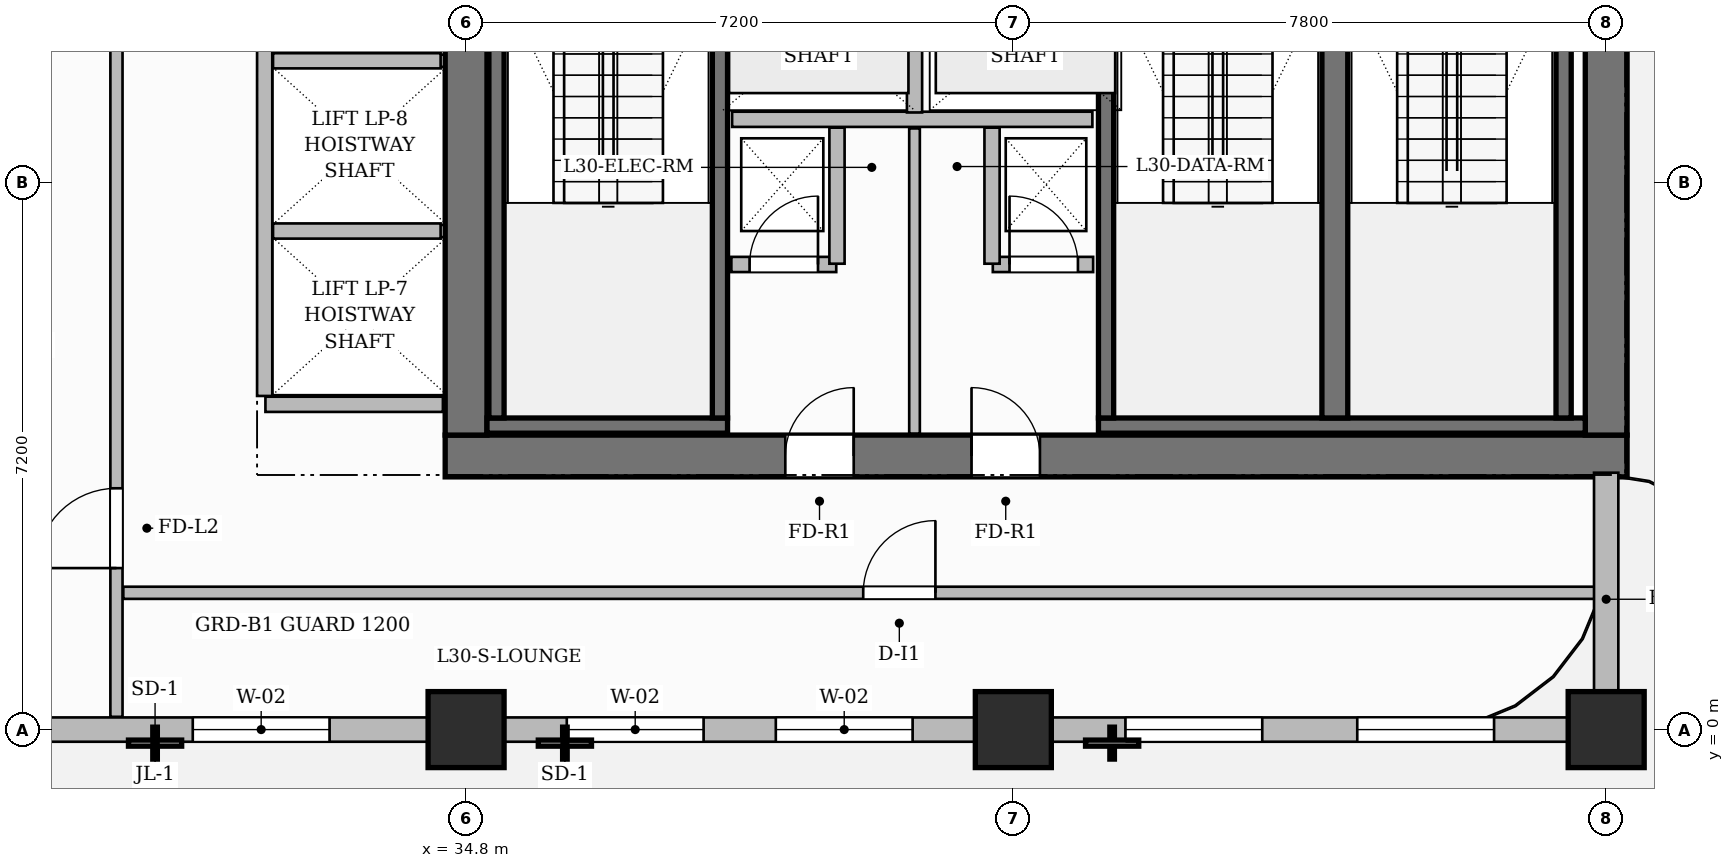
"""IFC4 building model, lengths in metres.
Left out: names, types, materials, properties, quantities, classifications, styles, units other than length and angle.
Written with IfcOpenShell. Run it as: python <this file> out.ifc"""

import sys

from ifc_helpers import new_model, si_unit, direction, frame, frame_2d, origin, origin_2d, place, context, subcontext, project, spatial, rectangle, extrude, source, transform, mapped, element, fill, save


model = new_model("IFC4")
c1 = context("Model", 3, precision=1e-05, world=origin(), true_north=direction((0.0, 1.0)))
c2 = subcontext(c1, "Body", "Model", "MODEL_VIEW")
j1 = project(units=[si_unit("LENGTHUNIT", "METRE"), si_unit("PLANEANGLEUNIT", "RADIAN")], contexts=[c1])
p1 = place(None, origin())
s1 = spatial("IfcSite", under=j1, at=p1, CompositionType="ELEMENT")
p2 = place(p1, origin())
s2 = spatial("IfcBuilding", under=s1, at=p2, CompositionType="ELEMENT")
p3 = place(p2, frame((0.0, 0.0, 122.9)))
s3 = spatial("IfcBuildingStorey", under=s2, at=p3, CompositionType="ELEMENT", Elevation=122.9)
p4 = place(p3, frame((34.525, 3.6, 0.0), z_axis=(0.0, 0.0, 1.0), x_axis=(1.0, 0.0, 0.0)))
e1 = element("IfcWall", 1, at=p4, inside=s3, PredefinedType="SHEAR", context=c2, shape_type="SweptSolid", body=[
    extrude(rectangle(XDim=15.55, YDim=0.55, at=frame_2d((7.775, 0.0))), origin(), (0.0, 0.0, 1.0), 3.7),
])
p5 = place(p4, frame((4.475, 0.0, 0.0)))
e2 = element("IfcOpeningElement", 2, at=p5, cuts=e1, PredefinedType="OPENING", context=c2, shape_type="SweptSolid", body=[
    extrude(rectangle(XDim=0.9, YDim=2.1, at=frame_2d((0.45, 1.05))), frame((0.0, 0.285, 0.0), z_axis=(0.0, -1.0, 0.0), x_axis=(1.0, 0.0, 0.0)), (0.0, 0.0, 1.0), 0.57),
])
p6 = place(p4, frame((6.925, 0.0, 0.0)))
e3 = element("IfcOpeningElement", 3, at=p6, cuts=e1, PredefinedType="OPENING", context=c2, shape_type="SweptSolid", body=[
    extrude(rectangle(XDim=0.9, YDim=2.1, at=frame_2d((0.45, 1.05))), frame((0.0, 0.285, 0.0), z_axis=(0.0, -1.0, 0.0), x_axis=(1.0, 0.0, 0.0)), (0.0, 0.0, 1.0), 0.57),
])
for number, where, z_axis, x_axis in (
    (4, (34.8, 3.875, 0.0), (0.0, 0.0, 1.0), (0.0, 1.0, 0.0)),
    (5, (49.8, 3.875, 0.0), (0.0, 0.0, 1.0), (0.0, 1.0, 0.0)),
):
    element("IfcWall", number, at=place(p3, frame(where, z_axis=z_axis, x_axis=x_axis)), inside=s3, PredefinedType="SHEAR", context=c2, shape_type="SweptSolid", body=[
        extrude(rectangle(XDim=10.25, YDim=0.55, at=frame_2d((5.125, 0.0))), origin(), (0.0, 0.0, 1.0), 3.7),
    ])
m1 = source(origin(), c2, "Body", "SweptSolid", [
    extrude(rectangle(XDim=1.0, YDim=1.0, at=origin_2d()), origin(), (0.0, 0.0, 1.0), 3.7),
])
for number, where, z_axis, x_axis in (
    (6, (34.8, 0.0, 0.0), (0.0, 0.0, 1.0), (1.0, 0.0, 0.0)),
    (7, (42.0, 0.0, 0.0), (0.0, 0.0, 1.0), (1.0, 0.0, 0.0)),
    (8, (49.8, 0.0, 0.0), (0.0, 0.0, 1.0), (1.0, 0.0, 0.0)),
):
    element("IfcColumn", number, at=place(p3, frame(where, z_axis=z_axis, x_axis=x_axis)), inside=s3, PredefinedType="COLUMN", context=c2, shape_type="MappedRepresentation", body=[
        mapped(m1, transform((0.0, 0.0, 0.0), scale=1.0)),
    ])
p7 = place(p3, frame((35.075, 4.0, 0.0), z_axis=(0.0, 0.0, 1.0), x_axis=(1.0, 0.0, 0.0)))
e9 = element("IfcWall", 9, at=p7, inside=s3, PredefinedType="SHEAR", context=c2, shape_type="SweptSolid", body=[
    extrude(rectangle(XDim=3.165, YDim=0.2, at=frame_2d((1.583, 0.0))), origin(), (0.0, 0.0, 1.0), 3.7),
])
for number, where, z_axis, x_axis in (
    (10, (35.2, 4.1, 0.0), (0.0, 0.0, 1.0), (0.0, 1.0, 0.0)),
    (11, (38.14, 4.1, 0.0), (0.0, 0.0, 1.0), (0.0, 1.0, 0.0)),
):
    element("IfcWall", number, at=place(p3, frame(where, z_axis=z_axis, x_axis=x_axis)), inside=s3, PredefinedType="SHEAR", context=c2, shape_type="SweptSolid", body=[
        extrude(rectangle(XDim=6.95, YDim=0.2, at=frame_2d((3.475, 0.0))), origin(), (0.0, 0.0, 1.0), 3.7),
    ])
p8 = place(p3, frame((43.12, 4.0, 0.0), z_axis=(0.0, 0.0, 1.0), x_axis=(1.0, 0.0, 0.0)))
e12 = element("IfcWall", 12, at=p8, inside=s3, PredefinedType="SHEAR", context=c2, shape_type="SweptSolid", body=[
    extrude(rectangle(XDim=6.405, YDim=0.2, at=frame_2d((3.202, 0.0))), origin(), (0.0, 0.0, 1.0), 3.7),
])
p9 = place(p3, frame((43.22, 4.1, 0.0), z_axis=(0.0, 0.0, 1.0), x_axis=(0.0, 1.0, 0.0)))
e13 = element("IfcWall", 13, at=p9, inside=s3, PredefinedType="SHEAR", context=c2, shape_type="SweptSolid", body=[
    extrude(rectangle(XDim=6.95, YDim=0.2, at=frame_2d((3.475, 0.0))), origin(), (0.0, 0.0, 1.0), 3.7),
])
p10 = place(p3, frame((46.23, 4.1, 0.0), z_axis=(0.0, 0.0, 1.0), x_axis=(0.0, 1.0, 0.0)))
e14 = element("IfcWall", 14, at=p10, inside=s3, PredefinedType="SHEAR", context=c2, shape_type="SweptSolid", body=[
    extrude(rectangle(XDim=6.95, YDim=0.34, at=frame_2d((3.475, 0.0))), origin(), (0.0, 0.0, 1.0), 3.7),
])
p11 = place(p3, frame((49.24, 4.1, 0.0), z_axis=(0.0, 0.0, 1.0), x_axis=(0.0, 1.0, 0.0)))
e15 = element("IfcWall", 15, at=p11, inside=s3, PredefinedType="SHEAR", context=c2, shape_type="SweptSolid", body=[
    extrude(rectangle(XDim=6.95, YDim=0.2, at=frame_2d((3.475, 0.0))), origin(), (0.0, 0.0, 1.0), 3.7),
])
p12 = place(p3, frame((38.3, 8.03, 0.0), z_axis=(0.0, 0.0, 1.0), x_axis=(1.0, 0.0, 0.0)))
e16 = element("IfcWall", 16, at=p12, inside=s3, PredefinedType="PARTITIONING", context=c2, shape_type="SweptSolid", body=[
    extrude(rectangle(XDim=4.74, YDim=0.2, at=frame_2d((2.37, 0.0))), origin(), (0.0, 0.0, 1.0), 3.45),
])
p13 = place(p3, frame((40.7, 8.12, 0.0), z_axis=(0.0, 0.0, 1.0), x_axis=(0.0, 1.0, 0.0)))
e17 = element("IfcWall", 17, at=p13, inside=s3, PredefinedType="PARTITIONING", context=c2, shape_type="SweptSolid", body=[
    extrude(rectangle(XDim=2.18, YDim=0.2, at=frame_2d((1.09, 0.0))), origin(), (0.0, 0.0, 1.0), 3.45),
])
p14 = place(p3, frame((38.29, 6.12, 0.0), z_axis=(0.0, 0.0, 1.0), x_axis=(1.0, 0.0, 0.0)))
e18 = element("IfcWall", 18, at=p14, inside=s3, PredefinedType="PARTITIONING", context=c2, shape_type="SweptSolid", body=[
    extrude(rectangle(XDim=1.38, YDim=0.2, at=frame_2d((0.69, 0.0))), origin(), (0.0, 0.0, 1.0), 3.45),
])
p15 = place(p14, frame((0.24, 0.0, 0.0)))
e19 = element("IfcOpeningElement", 19, at=p15, cuts=e18, PredefinedType="OPENING", context=c2, shape_type="SweptSolid", body=[
    extrude(rectangle(XDim=0.9, YDim=2.1, at=frame_2d((0.45, 1.05))), frame((0.0, 0.11, 0.0), z_axis=(0.0, -1.0, 0.0), x_axis=(1.0, 0.0, 0.0)), (0.0, 0.0, 1.0), 0.22),
])
p16 = place(p3, frame((39.68, 6.13, 0.0), z_axis=(0.0, 0.0, 1.0), x_axis=(0.0, 1.0, 0.0)))
e20 = element("IfcWall", 20, at=p16, inside=s3, PredefinedType="PARTITIONING", context=c2, shape_type="SweptSolid", body=[
    extrude(rectangle(XDim=1.79, YDim=0.2, at=frame_2d((0.895, 0.0))), origin(), (0.0, 0.0, 1.0), 3.45),
])
p17 = place(p3, frame((41.73, 6.12, 0.0), z_axis=(0.0, 0.0, 1.0), x_axis=(1.0, 0.0, 0.0)))
e21 = element("IfcWall", 21, at=p17, inside=s3, PredefinedType="PARTITIONING", context=c2, shape_type="SweptSolid", body=[
    extrude(rectangle(XDim=1.32, YDim=0.2, at=frame_2d((0.66, 0.0))), origin(), (0.0, 0.0, 1.0), 3.45),
])
p18 = place(p17, frame((0.22, 0.0, 0.0)))
e22 = element("IfcOpeningElement", 22, at=p18, cuts=e21, PredefinedType="OPENING", context=c2, shape_type="SweptSolid", body=[
    extrude(rectangle(XDim=0.9, YDim=2.1, at=frame_2d((0.45, 1.05))), frame((0.0, 0.11, 0.0), z_axis=(0.0, -1.0, 0.0), x_axis=(1.0, 0.0, 0.0)), (0.0, 0.0, 1.0), 0.22),
])
p19 = place(p3, frame((41.72, 6.13, 0.0), z_axis=(0.0, 0.0, 1.0), x_axis=(0.0, 1.0, 0.0)))
e23 = element("IfcWall", 23, at=p19, inside=s3, PredefinedType="PARTITIONING", context=c2, shape_type="SweptSolid", body=[
    extrude(rectangle(XDim=1.79, YDim=0.2, at=frame_2d((0.895, 0.0))), origin(), (0.0, 0.0, 1.0), 3.45),
])
p20 = place(p3, frame((40.7, 3.895, 0.0), z_axis=(0.0, 0.0, 1.0), x_axis=(0.0, 1.0, 0.0)))
e24 = element("IfcWall", 24, at=p20, inside=s3, PredefinedType="PARTITIONING", context=c2, shape_type="SweptSolid", body=[
    extrude(rectangle(XDim=4.015, YDim=0.14, at=frame_2d((2.007, 0.0))), origin(), (0.0, 0.0, 1.0), 3.45),
])
p21 = place(p3, frame((32.16, 4.28, 0.0), z_axis=(0.0, 0.0, 1.0), x_axis=(1.0, 0.0, 0.0)))
e25 = element("IfcWall", 25, at=p21, inside=s3, PredefinedType="PARTITIONING", context=c2, shape_type="SweptSolid", body=[
    extrude(rectangle(XDim=2.335, YDim=0.2, at=frame_2d((1.167, 0.0))), origin(), (0.0, 0.0, 1.0), 3.45),
])
p22 = place(p3, frame((32.15, 4.39, 0.0), z_axis=(0.0, 0.0, 1.0), x_axis=(0.0, 1.0, 0.0)))
e26 = element("IfcWall", 26, at=p22, inside=s3, PredefinedType="PARTITIONING", context=c2, shape_type="SweptSolid", body=[
    extrude(rectangle(XDim=8.82, YDim=0.2, at=frame_2d((4.41, 0.0))), origin(), (0.0, 0.0, 1.0), 3.45),
])
for number, where, z_axis, x_axis in (
    (27, (32.26, 6.56, 0.0), (0.0, 0.0, 1.0), (1.0, 0.0, 0.0)),
    (28, (32.26, 8.8, 0.0), (0.0, 0.0, 1.0), (1.0, 0.0, 0.0)),
):
    element("IfcWall", number, at=place(p3, frame(where, z_axis=z_axis, x_axis=x_axis)), inside=s3, PredefinedType="PARTITIONING", context=c2, shape_type="SweptSolid", body=[
        extrude(rectangle(XDim=2.205, YDim=0.2, at=frame_2d((1.103, 0.0))), origin(), (0.0, 0.0, 1.0), 3.45),
    ])
p23 = place(p3, frame((30.2, 0.168, 0.0), z_axis=(0.0, 0.0, 1.0), x_axis=(0.0, 1.0, 0.0)))
e29 = element("IfcWall", 29, at=p23, inside=s3, PredefinedType="PARTITIONING", context=c2, shape_type="SweptSolid", body=[
    extrude(rectangle(XDim=10.092, YDim=0.16, at=frame_2d((5.046, 0.0))), origin(), (0.0, 0.0, 1.0), 3.45),
])
p24 = place(p23, frame((1.957, 0.0, 0.0)))
e30 = element("IfcOpeningElement", 30, at=p24, cuts=e29, PredefinedType="OPENING", context=c2, shape_type="SweptSolid", body=[
    extrude(rectangle(XDim=1.05, YDim=2.15, at=frame_2d((0.525, 1.075))), frame((0.0, 0.09, 0.0), z_axis=(0.0, -1.0, 0.0), x_axis=(1.0, 0.0, 0.0)), (0.0, 0.0, 1.0), 0.18),
])
p25 = place(p3, frame((30.29, 1.8, 0.0), z_axis=(0.0, 0.0, 1.0), x_axis=(1.0, 0.0, 0.0)))
e31 = element("IfcWall", 31, at=p25, inside=s3, PredefinedType="PARTITIONING", context=c2, shape_type="SweptSolid", body=[
    extrude(rectangle(XDim=19.37, YDim=0.16, at=frame_2d((9.685, 0.0))), origin(), (0.0, 0.0, 1.0), 3.45),
])
p26 = place(p25, frame((9.735, 0.0, 0.0)))
e32 = element("IfcOpeningElement", 32, at=p26, cuts=e31, PredefinedType="OPENING", context=c2, shape_type="SweptSolid", body=[
    extrude(rectangle(XDim=0.95, YDim=2.15, at=frame_2d((0.475, 1.075))), frame((0.0, 0.09, 0.0), z_axis=(0.0, -1.0, 0.0), x_axis=(1.0, 0.0, 0.0)), (0.0, 0.0, 1.0), 0.18),
])
p27 = place(p3, frame((14.4, 0.0, 0.0), z_axis=(0.0, 0.0, 1.0), x_axis=(1.0, 0.0, 0.0)))
e33 = element("IfcWall", 33, at=p27, inside=s3, PredefinedType="SOLIDWALL", context=c2, shape_type="SweptSolid", body=[
    extrude(rectangle(XDim=35.4, YDim=0.32, at=frame_2d((17.7, 0.0))), origin(), (0.0, 0.0, 1.0), 2.935),
])
p28 = place(p27, frame((0.85, 0.0, 0.0)))
e34 = element("IfcOpeningElement", 34, at=p28, cuts=e33, PredefinedType="OPENING", context=c2, shape_type="SweptSolid", body=[
    extrude(rectangle(XDim=1.2, YDim=2.2, at=frame_2d((0.6, 1.1))), frame((0.0, 0.17, 0.0), z_axis=(0.0, -1.0, 0.0), x_axis=(1.0, 0.0, 0.0)), (0.0, 0.0, 1.0), 0.34),
])
p29 = place(p27, frame((2.671, 0.0, 0.8)))
e35 = element("IfcOpeningElement", 35, at=p29, cuts=e33, PredefinedType="OPENING", context=c2, shape_type="SweptSolid", body=[
    extrude(rectangle(XDim=0.95, YDim=1.75, at=frame_2d((0.475, 0.875))), frame((0.0, 0.17, 0.0), z_axis=(0.0, -1.0, 0.0), x_axis=(1.0, 0.0, 0.0)), (0.0, 0.0, 1.0), 0.34),
])
p30 = place(p27, frame((4.479, 0.0, 0.8)))
e36 = element("IfcOpeningElement", 36, at=p30, cuts=e33, PredefinedType="OPENING", context=c2, shape_type="SweptSolid", body=[
    extrude(rectangle(XDim=1.4, YDim=1.85, at=frame_2d((0.7, 0.925))), frame((0.0, 0.17, 0.0), z_axis=(0.0, -1.0, 0.0), x_axis=(1.0, 0.0, 0.0)), (0.0, 0.0, 1.0), 0.34),
])
p31 = place(p27, frame((8.181, 0.0, 0.8)))
e37 = element("IfcOpeningElement", 37, at=p31, cuts=e33, PredefinedType="OPENING", context=c2, shape_type="SweptSolid", body=[
    extrude(rectangle(XDim=0.95, YDim=1.75, at=frame_2d((0.475, 0.875))), frame((0.0, 0.17, 0.0), z_axis=(0.0, -1.0, 0.0), x_axis=(1.0, 0.0, 0.0)), (0.0, 0.0, 1.0), 0.34),
])
p32 = place(p27, frame((9.845, 0.0, 0.8)))
e38 = element("IfcOpeningElement", 38, at=p32, cuts=e33, PredefinedType="OPENING", context=c2, shape_type="SweptSolid", body=[
    extrude(rectangle(XDim=1.8, YDim=1.85, at=frame_2d((0.9, 0.925))), frame((0.0, 0.17, 0.0), z_axis=(0.0, -1.0, 0.0), x_axis=(1.0, 0.0, 0.0)), (0.0, 0.0, 1.0), 0.34),
])
p33 = place(p27, frame((12.414, 0.0, 0.8)))
e39 = element("IfcOpeningElement", 39, at=p33, cuts=e33, PredefinedType="OPENING", context=c2, shape_type="SweptSolid", body=[
    extrude(rectangle(XDim=0.95, YDim=1.75, at=frame_2d((0.475, 0.875))), frame((0.0, 0.17, 0.0), z_axis=(0.0, -1.0, 0.0), x_axis=(1.0, 0.0, 0.0)), (0.0, 0.0, 1.0), 0.34),
])
p34 = place(p27, frame((16.804, 0.0, 0.8)))
e40 = element("IfcOpeningElement", 40, at=p34, cuts=e33, PredefinedType="OPENING", context=c2, shape_type="SweptSolid", body=[
    extrude(rectangle(XDim=1.8, YDim=1.85, at=frame_2d((0.9, 0.925))), frame((0.0, 0.17, 0.0), z_axis=(0.0, -1.0, 0.0), x_axis=(1.0, 0.0, 0.0)), (0.0, 0.0, 1.0), 0.34),
])
p35 = place(p27, frame((21.725, 0.0, 0.8)))
e41 = element("IfcOpeningElement", 41, at=p35, cuts=e33, PredefinedType="OPENING", context=c2, shape_type="SweptSolid", body=[
    extrude(rectangle(XDim=1.8, YDim=1.85, at=frame_2d((0.9, 0.925))), frame((0.0, 0.17, 0.0), z_axis=(0.0, -1.0, 0.0), x_axis=(1.0, 0.0, 0.0)), (0.0, 0.0, 1.0), 0.34),
])
p36 = place(p27, frame((24.475, 0.0, 0.8)))
e42 = element("IfcOpeningElement", 42, at=p36, cuts=e33, PredefinedType="OPENING", context=c2, shape_type="SweptSolid", body=[
    extrude(rectangle(XDim=1.8, YDim=1.85, at=frame_2d((0.9, 0.925))), frame((0.0, 0.17, 0.0), z_axis=(0.0, -1.0, 0.0), x_axis=(1.0, 0.0, 0.0)), (0.0, 0.0, 1.0), 0.34),
])
p37 = place(p27, frame((29.075, 0.0, 0.8)))
e43 = element("IfcOpeningElement", 43, at=p37, cuts=e33, PredefinedType="OPENING", context=c2, shape_type="SweptSolid", body=[
    extrude(rectangle(XDim=1.8, YDim=1.85, at=frame_2d((0.9, 0.925))), frame((0.0, 0.17, 0.0), z_axis=(0.0, -1.0, 0.0), x_axis=(1.0, 0.0, 0.0)), (0.0, 0.0, 1.0), 0.34),
])
p38 = place(p27, frame((32.125, 0.0, 0.8)))
e44 = element("IfcOpeningElement", 44, at=p38, cuts=e33, PredefinedType="OPENING", context=c2, shape_type="SweptSolid", body=[
    extrude(rectangle(XDim=1.8, YDim=1.85, at=frame_2d((0.9, 0.925))), frame((0.0, 0.17, 0.0), z_axis=(0.0, -1.0, 0.0), x_axis=(1.0, 0.0, 0.0)), (0.0, 0.0, 1.0), 0.34),
])
p39 = place(p3, frame((49.8, 0.05, 0.0), z_axis=(0.0, 0.0, 1.0), x_axis=(0.0, 1.0, 0.0)))
e45 = element("IfcWall", 45, at=p39, inside=s3, PredefinedType="SOLIDWALL", context=c2, shape_type="SweptSolid", body=[
    extrude(rectangle(XDim=3.33, YDim=0.32, at=frame_2d((1.665, 0.0))), origin(), (0.0, 0.0, 1.0), 3.45),
])
m2 = source(origin(), c2, "Body", "SweptSolid", [
    extrude(rectangle(XDim=0.9, YDim=2.1, at=frame_2d((0.45, 1.05))), frame((0.0, 0.025, 0.0), z_axis=(0.0, -1.0, 0.0), x_axis=(1.0, 0.0, 0.0)), (0.0, 0.0, 1.0), 0.05),
])
p40 = place(p15, origin())
e46 = element("IfcDoor", 46, at=p40, inside=s3, OperationType="SINGLE_SWING_RIGHT", PredefinedType="DOOR", context=c2, shape_type="MappedRepresentation", body=[
    mapped(m2, transform((0.0, 0.0, 0.0), scale=1.0)),
])
fill(e19, e46)
p41 = place(p18, origin())
e47 = element("IfcDoor", 47, at=p41, inside=s3, OperationType="SINGLE_SWING_LEFT", PredefinedType="DOOR", context=c2, shape_type="MappedRepresentation", body=[
    mapped(m2, transform((0.0, 0.0, 0.0), scale=1.0)),
])
fill(e22, e47)
p42 = place(p5, origin())
e48 = element("IfcDoor", 48, at=p42, inside=s3, OperationType="SINGLE_SWING_RIGHT", PredefinedType="DOOR", context=c2, shape_type="MappedRepresentation", body=[
    mapped(m2, transform((0.0, 0.0, 0.0), scale=1.0)),
])
fill(e2, e48)
p43 = place(p6, origin())
e49 = element("IfcDoor", 49, at=p43, inside=s3, OperationType="SINGLE_SWING_LEFT", PredefinedType="DOOR", context=c2, shape_type="MappedRepresentation", body=[
    mapped(m2, transform((0.0, 0.0, 0.0), scale=1.0)),
])
fill(e3, e49)
m3 = source(origin(), c2, "Body", "SweptSolid", [
    extrude(rectangle(XDim=1.05, YDim=2.15, at=frame_2d((0.525, 1.075))), frame((0.0, 0.025, 0.0), z_axis=(0.0, -1.0, 0.0), x_axis=(1.0, 0.0, 0.0)), (0.0, 0.0, 1.0), 0.05),
])
p44 = place(p24, origin())
e50 = element("IfcDoor", 50, at=p44, inside=s3, OperationType="SINGLE_SWING_LEFT", PredefinedType="DOOR", context=c2, shape_type="MappedRepresentation", body=[
    mapped(m3, transform((0.0, 0.0, 0.0), scale=1.0)),
])
fill(e30, e50)
m4 = source(origin(), c2, "Body", "SweptSolid", [
    extrude(rectangle(XDim=0.95, YDim=2.15, at=frame_2d((0.475, 1.075))), frame((0.0, 0.025, 0.0), z_axis=(0.0, -1.0, 0.0), x_axis=(1.0, 0.0, 0.0)), (0.0, 0.0, 1.0), 0.05),
])
p45 = place(p26, origin())
e51 = element("IfcDoor", 51, at=p45, inside=s3, OperationType="SINGLE_SWING_RIGHT", PredefinedType="DOOR", context=c2, shape_type="MappedRepresentation", body=[
    mapped(m4, transform((0.0, 0.0, 0.0), scale=1.0)),
])
fill(e32, e51)
m5 = source(origin(), c2, "Body", "SweptSolid", [
    extrude(rectangle(XDim=1.8, YDim=1.85, at=frame_2d((0.9, 0.925))), frame((0.0, 0.03, 0.0), z_axis=(0.0, -1.0, 0.0), x_axis=(1.0, 0.0, 0.0)), (0.0, 0.0, 1.0), 0.06),
])
p46 = place(p34, origin())
e52 = element("IfcWindow", 52, at=p46, inside=s3, PartitioningType="DOUBLE_PANEL_VERTICAL", PredefinedType="WINDOW", context=c2, shape_type="MappedRepresentation", body=[
    mapped(m5, transform((0.0, 0.0, 0.0), scale=1.0)),
])
fill(e40, e52)
p47 = place(p35, origin())
e53 = element("IfcWindow", 53, at=p47, inside=s3, PartitioningType="DOUBLE_PANEL_VERTICAL", PredefinedType="WINDOW", context=c2, shape_type="MappedRepresentation", body=[
    mapped(m5, transform((0.0, 0.0, 0.0), scale=1.0)),
])
fill(e41, e53)
p48 = place(p36, origin())
e54 = element("IfcWindow", 54, at=p48, inside=s3, PartitioningType="DOUBLE_PANEL_VERTICAL", PredefinedType="WINDOW", context=c2, shape_type="MappedRepresentation", body=[
    mapped(m5, transform((0.0, 0.0, 0.0), scale=1.0)),
])
fill(e42, e54)
p49 = place(p37, origin())
e55 = element("IfcWindow", 55, at=p49, inside=s3, PartitioningType="DOUBLE_PANEL_VERTICAL", PredefinedType="WINDOW", context=c2, shape_type="MappedRepresentation", body=[
    mapped(m5, transform((0.0, 0.0, 0.0), scale=1.0)),
])
fill(e43, e55)
p50 = place(p38, origin())
e56 = element("IfcWindow", 56, at=p50, inside=s3, PartitioningType="DOUBLE_PANEL_VERTICAL", PredefinedType="WINDOW", context=c2, shape_type="MappedRepresentation", body=[
    mapped(m5, transform((0.0, 0.0, 0.0), scale=1.0)),
])
fill(e44, e56)
save(model, sys.argv[1])
